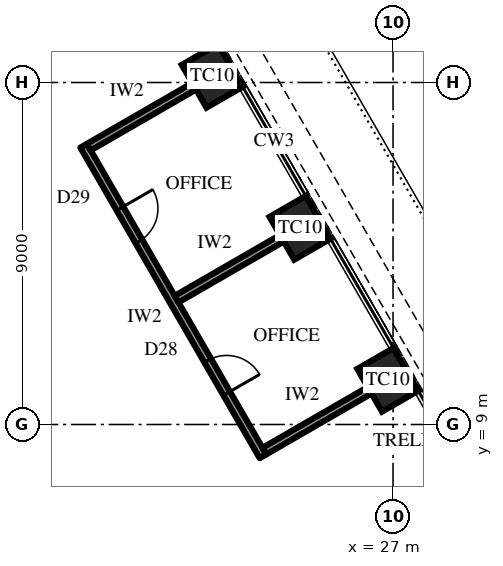
"""IFC4 building model, lengths in metres.
Left out: names, types, materials, properties, quantities, classifications, styles, units other than length and angle.
Written with IfcOpenShell. Run it as: python <this file> out.ifc"""

import sys

from ifc_helpers import new_model, si_unit, direction, frame, frame_2d, origin, origin_2d, place, context, subcontext, project, spatial, rectangle, extrude, element, fill, save


model = new_model("IFC4")
c1 = context("Model", 3, precision=1e-05, world=origin(), true_north=direction((0.0, 1.0)))
c2 = subcontext(c1, "Body", "Model", "MODEL_VIEW")
j1 = project(units=[si_unit("LENGTHUNIT", "METRE"), si_unit("PLANEANGLEUNIT", "RADIAN")], contexts=[c1])
p1 = place(None, origin())
s1 = spatial("IfcSite", under=j1, at=p1, CompositionType="ELEMENT")
p2 = place(p1, origin())
s2 = spatial("IfcBuilding", under=s1, at=p2, CompositionType="ELEMENT")
p3 = place(p2, frame((0.0, 0.0, 253.3)))
s3 = spatial("IfcBuildingStorey", under=s2, at=p3, CompositionType="ELEMENT", Elevation=253.3)
for number, where, z_axis, x_axis in (
    (1, (26.861, 10.175, 0.0), (0.0, 0.0, 1.0), (-0.5, 0.866, 0.0)),
    (2, (24.552, 14.175, 0.0), (0.0, 0.0, 1.0), (-0.5, 0.866, 0.0)),
    (3, (22.242, 18.175, 0.0), (0.0, 0.0, 1.0), (-0.5, 0.866, 0.0)),
):
    element("IfcColumn", number, at=place(p3, frame(where, z_axis=z_axis, x_axis=x_axis)), inside=s3, PredefinedType="COLUMN", context=c2, shape_type="SweptSolid", body=[
        extrude(rectangle(XDim=1.3, YDim=1.1, at=origin_2d()), origin(), (0.0, 0.0, 1.0), 4.2),
    ])
p4 = place(p3, frame((23.577, 8.163, 0.0), z_axis=(0.0, 0.0, 1.0), x_axis=(-0.499989672313, 0.866031366395, 0.0)))
e4 = element("IfcWall", 4, at=p4, inside=s3, PredefinedType="PARTITIONING", context=c2, shape_type="SweptSolid", body=[
    extrude(rectangle(XDim=9.438, YDim=0.2, at=frame_2d((4.719, 0.0))), origin(), (0.0, 0.0, 1.0), 4.0),
])
p5 = place(p4, frame((1.909, 0.0, 0.0)))
e5 = element("IfcOpeningElement", 5, at=p5, cuts=e4, PredefinedType="OPENING", context=c2, shape_type="SweptSolid", body=[
    extrude(rectangle(XDim=1.0, YDim=2.2, at=frame_2d((0.5, 1.1))), frame((0.0, 0.11, 0.0), z_axis=(0.0, -1.0, 0.0), x_axis=(1.0, 0.0, 0.0)), (0.0, 0.0, 1.0), 0.22),
])
p6 = place(p4, frame((6.528, 0.0, 0.0)))
e6 = element("IfcOpeningElement", 6, at=p6, cuts=e4, PredefinedType="OPENING", context=c2, shape_type="SweptSolid", body=[
    extrude(rectangle(XDim=1.0, YDim=2.2, at=frame_2d((0.5, 1.1))), frame((0.0, 0.11, 0.0), z_axis=(0.0, -1.0, 0.0), x_axis=(1.0, 0.0, 0.0)), (0.0, 0.0, 1.0), 0.22),
])
p7 = place(p3, frame((23.614, 8.3, 0.0), z_axis=(0.0, 0.0, 1.0), x_axis=(0.866061088033, 0.499938187974, 0.0)))
e7 = element("IfcWall", 7, at=p7, inside=s3, PredefinedType="PARTITIONING", context=c2, shape_type="SweptSolid", body=[
    extrude(rectangle(XDim=3.2, YDim=0.2, at=frame_2d((1.6, 0.0))), origin(), (0.0, 0.0, 1.0), 3.082),
])
for number, where, z_axis, x_axis in (
    (8, (21.304, 12.3, 0.0), (0.0, 0.0, 1.0), (0.866, 0.5, 0.0)),
    (9, (18.995, 16.3, 0.0), (0.0, 0.0, 1.0), (0.866, 0.5, 0.0)),
):
    element("IfcWall", number, at=place(p3, frame(where, z_axis=z_axis, x_axis=x_axis)), inside=s3, PredefinedType="PARTITIONING", context=c2, shape_type="SweptSolid", body=[
        extrude(rectangle(XDim=3.2, YDim=0.2, at=frame_2d((1.6, 0.0))), origin(), (0.0, 0.0, 1.0), 3.082),
    ])
p8 = place(p5, frame((1.0, 0.0, 0.0), z_axis=(0.0, 0.0, 1.0), x_axis=(-1.0, 0.0, 0.0)))
e10 = element("IfcDoor", 10, at=p8, inside=s3, OperationType="SINGLE_SWING_LEFT", PredefinedType="DOOR", context=c2, shape_type="SweptSolid", body=[
    extrude(rectangle(XDim=1.0, YDim=2.2, at=frame_2d((0.5, 1.1))), frame((0.0, 0.025, 0.0), z_axis=(0.0, -1.0, 0.0), x_axis=(1.0, 0.0, 0.0)), (0.0, 0.0, 1.0), 0.05),
])
fill(e5, e10)
p9 = place(p6, frame((1.0, 0.0, 0.0), z_axis=(0.0, 0.0, 1.0), x_axis=(-1.0, 0.0, 0.0)))
e11 = element("IfcDoor", 11, at=p9, inside=s3, OperationType="SINGLE_SWING_RIGHT", PredefinedType="DOOR", context=c2, shape_type="SweptSolid", body=[
    extrude(rectangle(XDim=1.0, YDim=2.2, at=frame_2d((0.5, 1.1))), frame((0.0, 0.025, 0.0), z_axis=(0.0, -1.0, 0.0), x_axis=(1.0, 0.0, 0.0)), (0.0, 0.0, 1.0), 0.05),
])
fill(e6, e11)
save(model, sys.argv[1])
